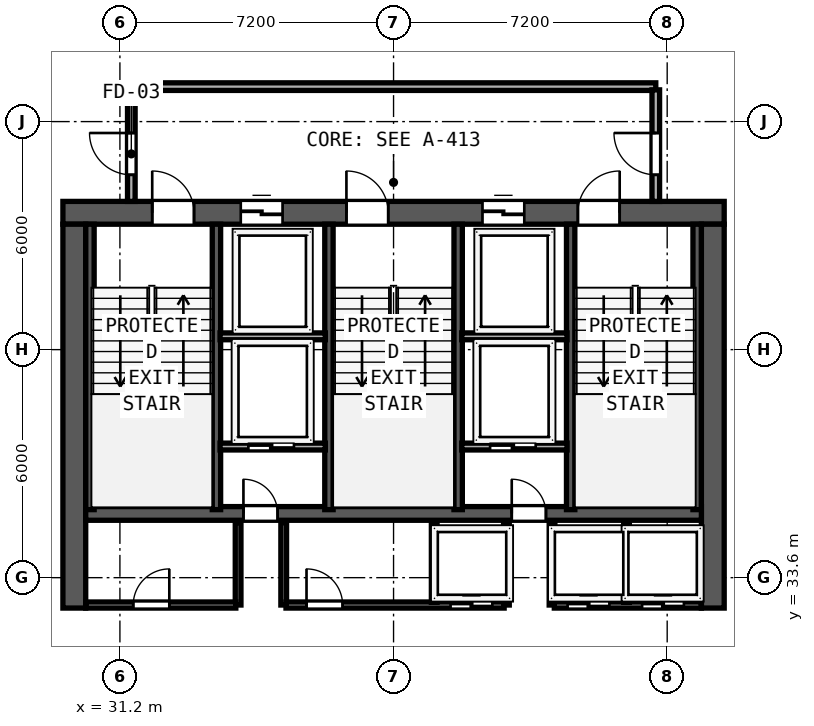
"""IFC4 building model, lengths in metres.
Left out: names, types, materials, properties, quantities, classifications, styles, units other than length and angle.
Written with IfcOpenShell. Run it as: python <this file> out.ifc"""

import sys

from ifc_helpers import new_model, si_unit, direction, frame, frame_2d, origin, place, context, subcontext, project, spatial, rectangle, extrude, element, fill, save


model = new_model("IFC4")
c1 = context("Model", 3, precision=1e-05, world=origin(), true_north=direction((0.0, 1.0)))
c2 = subcontext(c1, "Body", "Model", "MODEL_VIEW")
j1 = project(units=[si_unit("LENGTHUNIT", "METRE"), si_unit("PLANEANGLEUNIT", "RADIAN")], contexts=[c1])
p1 = place(None, origin())
s1 = spatial("IfcSite", under=j1, at=p1, CompositionType="ELEMENT")
p2 = place(p1, origin())
s2 = spatial("IfcBuilding", under=s1, at=p2, CompositionType="ELEMENT")
p3 = place(p2, frame((0.0, 0.0, 184.2)))
s3 = spatial("IfcBuildingStorey", under=s2, at=p3, CompositionType="ELEMENT", Elevation=184.2)
p4 = place(p3, frame((29.7, 43.2, 0.0), z_axis=(0.0, 0.0, 1.0), x_axis=(1.0, 0.0, 0.0)))
e1 = element("IfcWall", 1, at=p4, inside=s3, PredefinedType="SHEAR", context=c2, shape_type="SweptSolid", body=[
    extrude(rectangle(XDim=17.4, YDim=0.6, at=frame_2d((8.7, 0.0))), origin(), (0.0, 0.0, 1.0), 3.62),
])
p5 = place(p4, frame((2.35, 0.0, 0.0)))
e2 = element("IfcOpeningElement", 2, at=p5, cuts=e1, PredefinedType="OPENING", context=c2, shape_type="SweptSolid", body=[
    extrude(rectangle(XDim=1.1, YDim=2.15, at=frame_2d((0.55, 1.075))), frame((0.0, 0.31, 0.0), z_axis=(0.0, -1.0, 0.0), x_axis=(1.0, 0.0, 0.0)), (0.0, 0.0, 1.0), 0.62),
])
p6 = place(p4, frame((7.46, 0.0, 0.0)))
e3 = element("IfcOpeningElement", 3, at=p6, cuts=e1, PredefinedType="OPENING", context=c2, shape_type="SweptSolid", body=[
    extrude(rectangle(XDim=1.1, YDim=2.15, at=frame_2d((0.55, 1.075))), frame((0.0, 0.31, 0.0), z_axis=(0.0, -1.0, 0.0), x_axis=(1.0, 0.0, 0.0)), (0.0, 0.0, 1.0), 0.62),
])
p7 = place(p4, frame((13.55, 0.0, 0.0)))
e4 = element("IfcOpeningElement", 4, at=p7, cuts=e1, PredefinedType="OPENING", context=c2, shape_type="SweptSolid", body=[
    extrude(rectangle(XDim=1.1, YDim=2.15, at=frame_2d((0.55, 1.075))), frame((0.0, 0.31, 0.0), z_axis=(0.0, -1.0, 0.0), x_axis=(1.0, 0.0, 0.0)), (0.0, 0.0, 1.0), 0.62),
])
p8 = place(p4, frame((4.68, 0.0, 0.0)))
e5 = element("IfcOpeningElement", 5, at=p8, cuts=e1, PredefinedType="OPENING", context=c2, shape_type="SweptSolid", body=[
    extrude(rectangle(XDim=1.1, YDim=2.2, at=frame_2d((0.55, 1.1))), frame((0.0, 0.31, 0.0), z_axis=(0.0, -1.0, 0.0), x_axis=(1.0, 0.0, 0.0)), (0.0, 0.0, 1.0), 0.62),
])
p9 = place(p4, frame((11.04, 0.0, 0.0)))
e6 = element("IfcOpeningElement", 6, at=p9, cuts=e1, PredefinedType="OPENING", context=c2, shape_type="SweptSolid", body=[
    extrude(rectangle(XDim=1.1, YDim=2.2, at=frame_2d((0.55, 1.1))), frame((0.0, 0.31, 0.0), z_axis=(0.0, -1.0, 0.0), x_axis=(1.0, 0.0, 0.0)), (0.0, 0.0, 1.0), 0.62),
])
for number, where, z_axis, x_axis in (
    (7, (30.0, 32.8, 0.0), (0.0, 0.0, 1.0), (0.0, 1.0, 0.0)),
    (8, (46.8, 32.8, 0.0), (0.0, 0.0, 1.0), (0.0, 1.0, 0.0)),
):
    element("IfcWall", number, at=place(p3, frame(where, z_axis=z_axis, x_axis=x_axis)), inside=s3, PredefinedType="SHEAR", context=c2, shape_type="SweptSolid", body=[
        extrude(rectangle(XDim=10.1, YDim=0.6, at=frame_2d((5.05, 0.0))), origin(), (0.0, 0.0, 1.0), 3.62),
    ])
p10 = place(p3, frame((30.3, 35.29, 0.0), z_axis=(0.0, 0.0, 1.0), x_axis=(1.0, 0.0, 0.0)))
e9 = element("IfcWall", 9, at=p10, inside=s3, PredefinedType="SHEAR", context=c2, shape_type="SweptSolid", body=[
    extrude(rectangle(XDim=16.2, YDim=0.36, at=frame_2d((8.1, 0.0))), origin(), (0.0, 0.0, 1.0), 3.62),
])
p11 = place(p10, frame((5.05, 0.0, 0.0), z_axis=(0.0, 0.0, 1.0), x_axis=(-1.0, 0.0, 0.0)))
e10 = element("IfcOpeningElement", 10, at=p11, cuts=e9, PredefinedType="OPENING", context=c2, shape_type="SweptSolid", body=[
    extrude(rectangle(XDim=0.9, YDim=2.1, at=frame_2d((0.45, 1.05))), frame((0.0, 0.19, 0.0), z_axis=(0.0, -1.0, 0.0), x_axis=(1.0, 0.0, 0.0)), (0.0, 0.0, 1.0), 0.38),
])
p12 = place(p10, frame((12.11, 0.0, 0.0), z_axis=(0.0, 0.0, 1.0), x_axis=(-1.0, 0.0, 0.0)))
e11 = element("IfcOpeningElement", 11, at=p12, cuts=e9, PredefinedType="OPENING", context=c2, shape_type="SweptSolid", body=[
    extrude(rectangle(XDim=0.9, YDim=2.1, at=frame_2d((0.45, 1.05))), frame((0.0, 0.19, 0.0), z_axis=(0.0, -1.0, 0.0), x_axis=(1.0, 0.0, 0.0)), (0.0, 0.0, 1.0), 0.38),
])
for number, where, z_axis, x_axis in (
    (12, (30.412, 35.39, 0.0), (0.0, 0.0, 1.0), (0.0, 1.0, 0.0)),
    (13, (33.74, 35.39, 0.0), (0.0, 0.0, 1.0), (0.0, 1.0, 0.0)),
    (14, (36.7, 35.39, 0.0), (0.0, 0.0, 1.0), (0.0, 1.0, 0.0)),
    (15, (40.1, 35.39, 0.0), (0.0, 0.0, 1.0), (0.0, 1.0, 0.0)),
    (16, (43.06, 35.39, 0.0), (0.0, 0.0, 1.0), (0.0, 1.0, 0.0)),
    (17, (46.388, 35.39, 0.0), (0.0, 0.0, 1.0), (0.0, 1.0, 0.0)),
):
    element("IfcWall", number, at=place(p3, frame(where, z_axis=z_axis, x_axis=x_axis)), inside=s3, PredefinedType="SHEAR", context=c2, shape_type="SweptSolid", body=[
        extrude(rectangle(XDim=7.51, YDim=0.22, at=frame_2d((3.755, 0.0))), origin(), (0.0, 0.0, 1.0), 3.62),
    ])
p13 = place(p3, frame((31.5, 46.52, 0.0), z_axis=(0.0, 0.0, 1.0), x_axis=(1.0, 0.0, 0.0)))
e18 = element("IfcWall", 18, at=p13, inside=s3, PredefinedType="SOLIDWALL", context=c2, shape_type="SweptSolid", body=[
    extrude(rectangle(XDim=13.8, YDim=0.2, at=frame_2d((6.9, 0.0))), origin(), (0.0, 0.0, 1.0), 3.62),
])
p14 = place(p3, frame((31.5, 43.5, 0.0), z_axis=(0.0, 0.0, 1.0), x_axis=(0.0, 1.0, 0.0)))
e19 = element("IfcWall", 19, at=p14, inside=s3, PredefinedType="SOLIDWALL", context=c2, shape_type="SweptSolid", body=[
    extrude(rectangle(XDim=2.935, YDim=0.2, at=frame_2d((1.468, 0.0))), origin(), (0.0, 0.0, 1.0), 3.62),
])
p15 = place(p14, frame((1.8, 0.0, 0.0), z_axis=(0.0, 0.0, 1.0), x_axis=(-1.0, 0.0, 0.0)))
e20 = element("IfcOpeningElement", 20, at=p15, cuts=e19, PredefinedType="OPENING", context=c2, shape_type="SweptSolid", body=[
    extrude(rectangle(XDim=1.1, YDim=2.15, at=frame_2d((0.55, 1.075))), frame((0.0, 0.11, 0.0), z_axis=(0.0, -1.0, 0.0), x_axis=(1.0, 0.0, 0.0)), (0.0, 0.0, 1.0), 0.22),
])
p16 = place(p3, frame((45.3, 43.5, 0.0), z_axis=(0.0, 0.0, 1.0), x_axis=(0.0, 1.0, 0.0)))
e21 = element("IfcWall", 21, at=p16, inside=s3, PredefinedType="SOLIDWALL", context=c2, shape_type="SweptSolid", body=[
    extrude(rectangle(XDim=2.935, YDim=0.2, at=frame_2d((1.468, 0.0))), origin(), (0.0, 0.0, 1.0), 3.62),
])
p17 = place(p16, frame((0.7, 0.0, 0.0)))
e22 = element("IfcOpeningElement", 22, at=p17, cuts=e21, PredefinedType="OPENING", context=c2, shape_type="SweptSolid", body=[
    extrude(rectangle(XDim=1.1, YDim=2.15, at=frame_2d((0.55, 1.075))), frame((0.0, 0.11, 0.0), z_axis=(0.0, -1.0, 0.0), x_axis=(1.0, 0.0, 0.0)), (0.0, 0.0, 1.0), 0.22),
])
for number, where, z_axis, x_axis in (
    (23, (33.835, 39.95, 0.0), (0.0, 0.0, 1.0), (1.0, 0.0, 0.0)),
    (24, (40.195, 39.95, 0.0), (0.0, 0.0, 1.0), (1.0, 0.0, 0.0)),
):
    element("IfcWall", number, at=place(p3, frame(where, z_axis=z_axis, x_axis=x_axis)), inside=s3, PredefinedType="SOLIDWALL", context=c2, shape_type="SweptSolid", body=[
        extrude(rectangle(XDim=2.77, YDim=0.18, at=frame_2d((1.385, 0.0))), origin(), (0.0, 0.0, 1.0), 3.62),
    ])
p18 = place(p3, frame((33.835, 37.05, 0.0), z_axis=(0.0, 0.0, 1.0), x_axis=(1.0, 0.0, 0.0)))
e25 = element("IfcWall", 25, at=p18, inside=s3, PredefinedType="SOLIDWALL", context=c2, shape_type="SweptSolid", body=[
    extrude(rectangle(XDim=2.77, YDim=0.18, at=frame_2d((1.385, 0.0))), origin(), (0.0, 0.0, 1.0), 3.62),
])
p19 = place(p18, frame((1.945, 0.0, 0.0), z_axis=(0.0, 0.0, 1.0), x_axis=(-1.0, 0.0, 0.0)))
e26 = element("IfcOpeningElement", 26, at=p19, cuts=e25, PredefinedType="OPENING", context=c2, shape_type="SweptSolid", body=[
    extrude(rectangle(XDim=1.2, YDim=2.2, at=frame_2d((0.6, 1.1))), frame((0.0, 0.1, 0.0), z_axis=(0.0, -1.0, 0.0), x_axis=(1.0, 0.0, 0.0)), (0.0, 0.0, 1.0), 0.2),
])
for number, where, z_axis, x_axis in (
    (27, (34.31, 32.88, 0.0), (0.0, 0.0, 1.0), (0.0, 1.0, 0.0)),
    (28, (35.51, 32.88, 0.0), (0.0, 0.0, 1.0), (0.0, 1.0, 0.0)),
):
    element("IfcWall", number, at=place(p3, frame(where, z_axis=z_axis, x_axis=x_axis)), inside=s3, PredefinedType="SOLIDWALL", context=c2, shape_type="SweptSolid", body=[
        extrude(rectangle(XDim=2.17, YDim=0.15, at=frame_2d((1.085, 0.0))), origin(), (0.0, 0.0, 1.0), 3.62),
    ])
p20 = place(p3, frame((40.195, 37.05, 0.0), z_axis=(0.0, 0.0, 1.0), x_axis=(1.0, 0.0, 0.0)))
e29 = element("IfcWall", 29, at=p20, inside=s3, PredefinedType="SOLIDWALL", context=c2, shape_type="SweptSolid", body=[
    extrude(rectangle(XDim=2.77, YDim=0.18, at=frame_2d((1.385, 0.0))), origin(), (0.0, 0.0, 1.0), 3.62),
])
p21 = place(p20, frame((1.945, 0.0, 0.0), z_axis=(0.0, 0.0, 1.0), x_axis=(-1.0, 0.0, 0.0)))
e30 = element("IfcOpeningElement", 30, at=p21, cuts=e29, PredefinedType="OPENING", context=c2, shape_type="SweptSolid", body=[
    extrude(rectangle(XDim=1.2, YDim=2.2, at=frame_2d((0.6, 1.1))), frame((0.0, 0.1, 0.0), z_axis=(0.0, -1.0, 0.0), x_axis=(1.0, 0.0, 0.0)), (0.0, 0.0, 1.0), 0.2),
])
for number, where, z_axis, x_axis in (
    (31, (41.37, 32.88, 0.0), (0.0, 0.0, 1.0), (0.0, 1.0, 0.0)),
    (32, (42.57, 32.88, 0.0), (0.0, 0.0, 1.0), (0.0, 1.0, 0.0)),
):
    element("IfcWall", number, at=place(p3, frame(where, z_axis=z_axis, x_axis=x_axis)), inside=s3, PredefinedType="SOLIDWALL", context=c2, shape_type="SweptSolid", body=[
        extrude(rectangle(XDim=2.17, YDim=0.15, at=frame_2d((1.085, 0.0))), origin(), (0.0, 0.0, 1.0), 3.62),
    ])
p22 = place(p3, frame((30.3, 32.88, 0.0), z_axis=(0.0, 0.0, 1.0), x_axis=(1.0, 0.0, 0.0)))
e33 = element("IfcWall", 33, at=p22, inside=s3, PredefinedType="SOLIDWALL", context=c2, shape_type="SweptSolid", body=[
    extrude(rectangle(XDim=3.95, YDim=0.16, at=frame_2d((1.975, 0.0))), origin(), (0.0, 0.0, 1.0), 3.62),
])
p23 = place(p22, frame((2.2, 0.0, 0.0), z_axis=(0.0, 0.0, 1.0), x_axis=(-1.0, 0.0, 0.0)))
e34 = element("IfcOpeningElement", 34, at=p23, cuts=e33, PredefinedType="OPENING", context=c2, shape_type="SweptSolid", body=[
    extrude(rectangle(XDim=0.95, YDim=2.12, at=frame_2d((0.475, 1.06))), frame((0.0, 0.09, 0.0), z_axis=(0.0, -1.0, 0.0), x_axis=(1.0, 0.0, 0.0)), (0.0, 0.0, 1.0), 0.18),
])
p24 = place(p3, frame((35.57, 32.88, 0.0), z_axis=(0.0, 0.0, 1.0), x_axis=(1.0, 0.0, 0.0)))
e35 = element("IfcWall", 35, at=p24, inside=s3, PredefinedType="SOLIDWALL", context=c2, shape_type="SweptSolid", body=[
    extrude(rectangle(XDim=5.74, YDim=0.16, at=frame_2d((2.87, 0.0))), origin(), (0.0, 0.0, 1.0), 3.62),
])
p25 = place(p24, frame((1.49, 0.0, 0.0), z_axis=(0.0, 0.0, 1.0), x_axis=(-1.0, 0.0, 0.0)))
e36 = element("IfcOpeningElement", 36, at=p25, cuts=e35, PredefinedType="OPENING", context=c2, shape_type="SweptSolid", body=[
    extrude(rectangle(XDim=0.95, YDim=2.12, at=frame_2d((0.475, 1.06))), frame((0.0, 0.09, 0.0), z_axis=(0.0, -1.0, 0.0), x_axis=(1.0, 0.0, 0.0)), (0.0, 0.0, 1.0), 0.18),
])
p26 = place(p24, frame((5.43, 0.0, 0.0), z_axis=(0.0, 0.0, 1.0), x_axis=(-1.0, 0.0, 0.0)))
e37 = element("IfcOpeningElement", 37, at=p26, cuts=e35, PredefinedType="OPENING", context=c2, shape_type="SweptSolid", body=[
    extrude(rectangle(XDim=1.1, YDim=2.2, at=frame_2d((0.55, 1.1))), frame((0.0, 0.09, 0.0), z_axis=(0.0, -1.0, 0.0), x_axis=(1.0, 0.0, 0.0)), (0.0, 0.0, 1.0), 0.18),
])
p27 = place(p3, frame((42.63, 32.88, 0.0), z_axis=(0.0, 0.0, 1.0), x_axis=(1.0, 0.0, 0.0)))
e38 = element("IfcWall", 38, at=p27, inside=s3, PredefinedType="SOLIDWALL", context=c2, shape_type="SweptSolid", body=[
    extrude(rectangle(XDim=3.87, YDim=0.16, at=frame_2d((1.935, 0.0))), origin(), (0.0, 0.0, 1.0), 3.62),
])
p28 = place(p27, frame((1.45, 0.0, 0.0), z_axis=(0.0, 0.0, 1.0), x_axis=(-1.0, 0.0, 0.0)))
e39 = element("IfcOpeningElement", 39, at=p28, cuts=e38, PredefinedType="OPENING", context=c2, shape_type="SweptSolid", body=[
    extrude(rectangle(XDim=1.1, YDim=2.2, at=frame_2d((0.55, 1.1))), frame((0.0, 0.09, 0.0), z_axis=(0.0, -1.0, 0.0), x_axis=(1.0, 0.0, 0.0)), (0.0, 0.0, 1.0), 0.18),
])
p29 = place(p27, frame((3.41, 0.0, 0.0), z_axis=(0.0, 0.0, 1.0), x_axis=(-1.0, 0.0, 0.0)))
e40 = element("IfcOpeningElement", 40, at=p29, cuts=e38, PredefinedType="OPENING", context=c2, shape_type="SweptSolid", body=[
    extrude(rectangle(XDim=1.1, YDim=2.2, at=frame_2d((0.55, 1.1))), frame((0.0, 0.09, 0.0), z_axis=(0.0, -1.0, 0.0), x_axis=(1.0, 0.0, 0.0)), (0.0, 0.0, 1.0), 0.18),
])
for number, where, z_axis, x_axis in (
    (41, (39.47, 32.95, 0.0), (0.0, 0.0, 1.0), (0.0, 1.0, 0.0)),
    (42, (44.53, 32.95, 0.0), (0.0, 0.0, 1.0), (0.0, 1.0, 0.0)),
):
    element("IfcWall", number, at=place(p3, frame(where, z_axis=z_axis, x_axis=x_axis)), inside=s3, PredefinedType="SOLIDWALL", context=c2, shape_type="SweptSolid", body=[
        extrude(rectangle(XDim=2.05, YDim=0.15, at=frame_2d((1.025, 0.0))), origin(), (0.0, 0.0, 1.0), 3.62),
    ])
p30 = place(p5, origin())
e43 = element("IfcDoor", 43, at=p30, inside=s3, OperationType="SINGLE_SWING_LEFT", PredefinedType="DOOR", context=c2, shape_type="SweptSolid", body=[
    extrude(rectangle(XDim=1.1, YDim=2.15, at=frame_2d((0.55, 1.075))), frame((0.0, 0.185, 0.0), z_axis=(0.0, -1.0, 0.0), x_axis=(1.0, 0.0, 0.0)), (0.0, 0.0, 1.0), 0.05),
])
fill(e2, e43)
p31 = place(p6, origin())
e44 = element("IfcDoor", 44, at=p31, inside=s3, OperationType="SINGLE_SWING_LEFT", PredefinedType="DOOR", context=c2, shape_type="SweptSolid", body=[
    extrude(rectangle(XDim=1.1, YDim=2.15, at=frame_2d((0.55, 1.075))), frame((0.0, 0.185, 0.0), z_axis=(0.0, -1.0, 0.0), x_axis=(1.0, 0.0, 0.0)), (0.0, 0.0, 1.0), 0.05),
])
fill(e3, e44)
p32 = place(p7, origin())
e45 = element("IfcDoor", 45, at=p32, inside=s3, OperationType="SINGLE_SWING_RIGHT", PredefinedType="DOOR", context=c2, shape_type="SweptSolid", body=[
    extrude(rectangle(XDim=1.1, YDim=2.15, at=frame_2d((0.55, 1.075))), frame((0.0, 0.185, 0.0), z_axis=(0.0, -1.0, 0.0), x_axis=(1.0, 0.0, 0.0)), (0.0, 0.0, 1.0), 0.05),
])
fill(e4, e45)
p33 = place(p15, origin())
e46 = element("IfcDoor", 46, at=p33, inside=s3, OperationType="SINGLE_SWING_LEFT", PredefinedType="DOOR", context=c2, shape_type="SweptSolid", body=[
    extrude(rectangle(XDim=1.1, YDim=2.15, at=frame_2d((0.55, 1.075))), frame((0.0, 0.025, 0.0), z_axis=(0.0, -1.0, 0.0), x_axis=(1.0, 0.0, 0.0)), (0.0, 0.0, 1.0), 0.05),
])
fill(e20, e46)
p34 = place(p17, origin())
e47 = element("IfcDoor", 47, at=p34, inside=s3, OperationType="SINGLE_SWING_RIGHT", PredefinedType="DOOR", context=c2, shape_type="SweptSolid", body=[
    extrude(rectangle(XDim=1.1, YDim=2.15, at=frame_2d((0.55, 1.075))), frame((0.0, 0.025, 0.0), z_axis=(0.0, -1.0, 0.0), x_axis=(1.0, 0.0, 0.0)), (0.0, 0.0, 1.0), 0.05),
])
fill(e22, e47)
p35 = place(p8, origin())
e48 = element("IfcDoor", 48, at=p35, inside=s3, OperationType="SLIDING_TO_LEFT", PredefinedType="DOOR", context=c2, shape_type="SweptSolid", body=[
    extrude(rectangle(XDim=1.1, YDim=2.2, at=frame_2d((0.55, 1.1))), frame((0.0, 0.185, 0.0), z_axis=(0.0, -1.0, 0.0), x_axis=(1.0, 0.0, 0.0)), (0.0, 0.0, 1.0), 0.05),
])
fill(e5, e48)
p36 = place(p9, origin())
e49 = element("IfcDoor", 49, at=p36, inside=s3, OperationType="SLIDING_TO_LEFT", PredefinedType="DOOR", context=c2, shape_type="SweptSolid", body=[
    extrude(rectangle(XDim=1.1, YDim=2.2, at=frame_2d((0.55, 1.1))), frame((0.0, 0.185, 0.0), z_axis=(0.0, -1.0, 0.0), x_axis=(1.0, 0.0, 0.0)), (0.0, 0.0, 1.0), 0.05),
])
fill(e6, e49)
p37 = place(p19, origin())
e50 = element("IfcDoor", 50, at=p37, inside=s3, OperationType="SLIDING_TO_RIGHT", PredefinedType="DOOR", context=c2, shape_type="SweptSolid", body=[
    extrude(rectangle(XDim=1.2, YDim=2.2, at=frame_2d((0.6, 1.1))), frame((0.0, 0.025, 0.0), z_axis=(0.0, -1.0, 0.0), x_axis=(1.0, 0.0, 0.0)), (0.0, 0.0, 1.0), 0.05),
])
fill(e26, e50)
p38 = place(p11, origin())
e51 = element("IfcDoor", 51, at=p38, inside=s3, OperationType="SINGLE_SWING_RIGHT", PredefinedType="DOOR", context=c2, shape_type="SweptSolid", body=[
    extrude(rectangle(XDim=0.9, YDim=2.1, at=frame_2d((0.45, 1.05))), frame((0.0, 0.025, 0.0), z_axis=(0.0, -1.0, 0.0), x_axis=(1.0, 0.0, 0.0)), (0.0, 0.0, 1.0), 0.05),
])
fill(e10, e51)
p39 = place(p21, origin())
e52 = element("IfcDoor", 52, at=p39, inside=s3, OperationType="SLIDING_TO_RIGHT", PredefinedType="DOOR", context=c2, shape_type="SweptSolid", body=[
    extrude(rectangle(XDim=1.2, YDim=2.2, at=frame_2d((0.6, 1.1))), frame((0.0, 0.025, 0.0), z_axis=(0.0, -1.0, 0.0), x_axis=(1.0, 0.0, 0.0)), (0.0, 0.0, 1.0), 0.05),
])
fill(e30, e52)
p40 = place(p12, origin())
e53 = element("IfcDoor", 53, at=p40, inside=s3, OperationType="SINGLE_SWING_RIGHT", PredefinedType="DOOR", context=c2, shape_type="SweptSolid", body=[
    extrude(rectangle(XDim=0.9, YDim=2.1, at=frame_2d((0.45, 1.05))), frame((0.0, 0.025, 0.0), z_axis=(0.0, -1.0, 0.0), x_axis=(1.0, 0.0, 0.0)), (0.0, 0.0, 1.0), 0.05),
])
fill(e11, e53)
p41 = place(p23, origin())
e54 = element("IfcDoor", 54, at=p41, inside=s3, OperationType="SINGLE_SWING_LEFT", PredefinedType="DOOR", context=c2, shape_type="SweptSolid", body=[
    extrude(rectangle(XDim=0.95, YDim=2.12, at=frame_2d((0.475, 1.06))), frame((0.0, 0.025, 0.0), z_axis=(0.0, -1.0, 0.0), x_axis=(1.0, 0.0, 0.0)), (0.0, 0.0, 1.0), 0.05),
])
fill(e34, e54)
p42 = place(p25, origin())
e55 = element("IfcDoor", 55, at=p42, inside=s3, OperationType="SINGLE_SWING_RIGHT", PredefinedType="DOOR", context=c2, shape_type="SweptSolid", body=[
    extrude(rectangle(XDim=0.95, YDim=2.12, at=frame_2d((0.475, 1.06))), frame((0.0, 0.025, 0.0), z_axis=(0.0, -1.0, 0.0), x_axis=(1.0, 0.0, 0.0)), (0.0, 0.0, 1.0), 0.05),
])
fill(e36, e55)
p43 = place(p26, origin())
e56 = element("IfcDoor", 56, at=p43, inside=s3, OperationType="SLIDING_TO_RIGHT", PredefinedType="DOOR", context=c2, shape_type="SweptSolid", body=[
    extrude(rectangle(XDim=1.1, YDim=2.2, at=frame_2d((0.55, 1.1))), frame((0.0, 0.025, 0.0), z_axis=(0.0, -1.0, 0.0), x_axis=(1.0, 0.0, 0.0)), (0.0, 0.0, 1.0), 0.05),
])
fill(e37, e56)
p44 = place(p28, origin())
e57 = element("IfcDoor", 57, at=p44, inside=s3, OperationType="SLIDING_TO_RIGHT", PredefinedType="DOOR", context=c2, shape_type="SweptSolid", body=[
    extrude(rectangle(XDim=1.1, YDim=2.2, at=frame_2d((0.55, 1.1))), frame((0.0, 0.025, 0.0), z_axis=(0.0, -1.0, 0.0), x_axis=(1.0, 0.0, 0.0)), (0.0, 0.0, 1.0), 0.05),
])
fill(e39, e57)
p45 = place(p29, origin())
e58 = element("IfcDoor", 58, at=p45, inside=s3, OperationType="SLIDING_TO_RIGHT", PredefinedType="DOOR", context=c2, shape_type="SweptSolid", body=[
    extrude(rectangle(XDim=1.1, YDim=2.2, at=frame_2d((0.55, 1.1))), frame((0.0, 0.025, 0.0), z_axis=(0.0, -1.0, 0.0), x_axis=(1.0, 0.0, 0.0)), (0.0, 0.0, 1.0), 0.05),
])
fill(e40, e58)
save(model, sys.argv[1])
